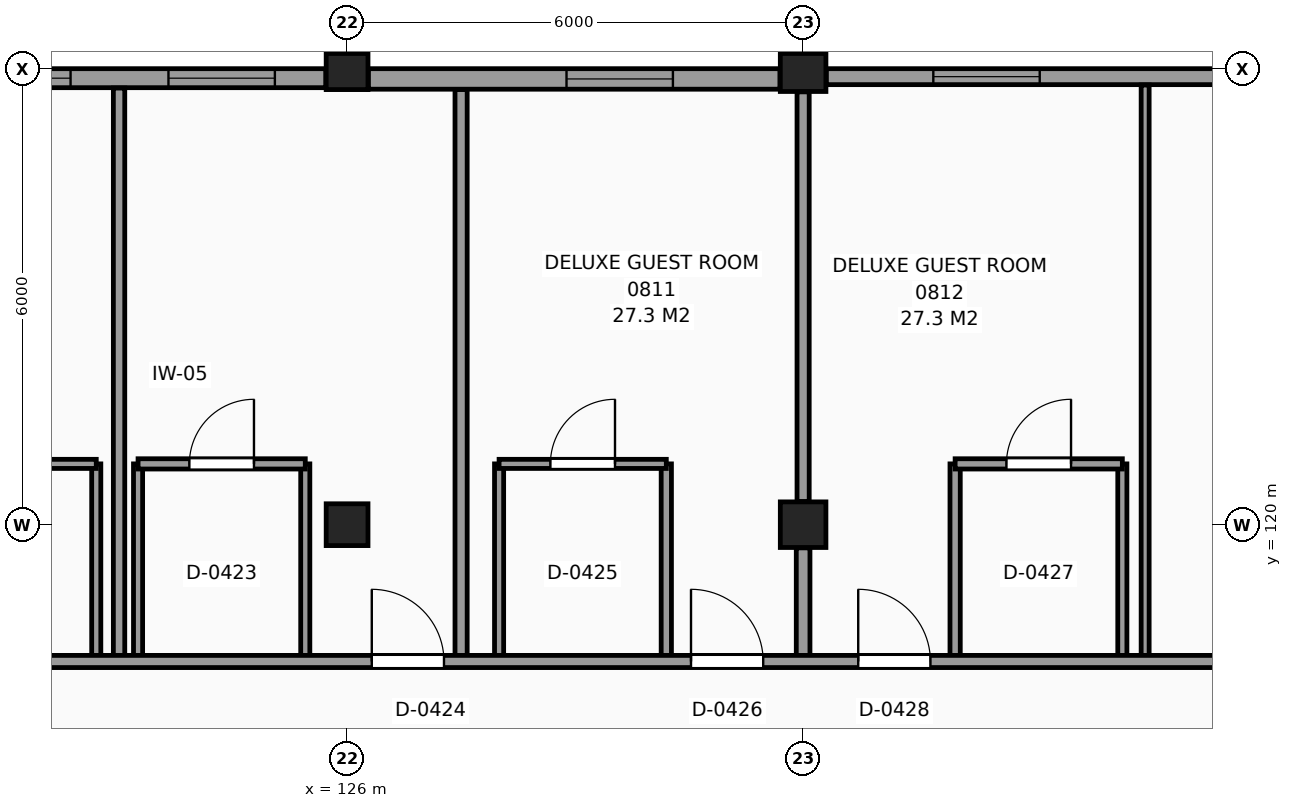
"""IFC4 building model, lengths in metres.
Left out: names, types, materials, properties, quantities, classifications, styles, units other than length and angle.
Written with IfcOpenShell. Run it as: python <this file> out.ifc"""

import sys

from ifc_helpers import new_model, si_unit, direction, frame, frame_2d, origin, origin_2d, place, context, subcontext, project, spatial, rectangle, extrude, element, fill, save


model = new_model("IFC4")
c1 = context("Model", 3, precision=1e-05, world=origin(), true_north=direction((0.0, 1.0)))
c2 = subcontext(c1, "Body", "Model", "MODEL_VIEW")
j1 = project(units=[si_unit("LENGTHUNIT", "METRE"), si_unit("PLANEANGLEUNIT", "RADIAN")], contexts=[c1])
p1 = place(None, origin())
s1 = spatial("IfcSite", under=j1, at=p1, CompositionType="ELEMENT")
p2 = place(p1, origin())
s2 = spatial("IfcBuilding", under=s1, at=p2, CompositionType="ELEMENT")
p3 = place(p2, frame((0.0, 0.0, 34.8)))
s3 = spatial("IfcBuildingStorey", under=s2, at=p3, CompositionType="ELEMENT", Elevation=34.8)
for number, where, z_axis, x_axis in (
    (1, (126.0, 120.0, 0.0), (0.0, 0.0, 1.0), (1.0, 0.0, 0.0)),
    (2, (126.0, 126.0, 0.0), (0.0, 0.0, 1.0), (1.0, 0.0, 0.0)),
):
    element("IfcColumn", number, at=place(p3, frame(where, z_axis=z_axis, x_axis=x_axis)), inside=s3, PredefinedType="COLUMN", context=c2, shape_type="SweptSolid", body=[
        extrude(rectangle(XDim=0.55, YDim=0.55, at=origin_2d()), origin(), (0.0, 0.0, 1.0), 3.3),
    ])
for number, where, z_axis, x_axis in (
    (3, (132.0, 120.0, 0.0), (0.0, 0.0, 1.0), (1.0, 0.0, 0.0)),
    (4, (132.0, 126.0, 0.0), (0.0, 0.0, 1.0), (1.0, 0.0, 0.0)),
):
    element("IfcColumn", number, at=place(p3, frame(where, z_axis=z_axis, x_axis=x_axis)), inside=s3, PredefinedType="COLUMN", context=c2, shape_type="SweptSolid", body=[
        extrude(rectangle(XDim=0.6, YDim=0.6, at=origin_2d()), origin(), (0.0, 0.0, 1.0), 3.3),
    ])
p4 = place(p3, frame((137.72, 125.895, 0.0), z_axis=(0.0, 0.0, 1.0), x_axis=(-1.0, 0.0, 0.0)))
e5 = element("IfcWall", 5, at=p4, inside=s3, PredefinedType="SOLIDWALL", context=c2, shape_type="SweptSolid", body=[
    extrude(rectangle(XDim=5.415, YDim=0.21, at=frame_2d((2.708, 0.0))), origin(), (0.0, 0.0, 1.0), 2.42),
])
p5 = place(p4, frame((2.607, 0.0, 0.8)))
e6 = element("IfcOpeningElement", 6, at=p5, cuts=e5, PredefinedType="OPENING", context=c2, shape_type="SweptSolid", body=[
    extrude(rectangle(XDim=1.4, YDim=1.4, at=frame_2d((0.7, 0.7))), frame((0.0, 0.115, 0.0), z_axis=(0.0, -1.0, 0.0), x_axis=(1.0, 0.0, 0.0)), (0.0, 0.0, 1.0), 0.23),
])
p6 = place(p3, frame((131.695, 125.865, 0.0), z_axis=(0.0, 0.0, 1.0), x_axis=(-1.0, 0.0, 0.0)))
e7 = element("IfcWall", 7, at=p6, inside=s3, PredefinedType="SOLIDWALL", context=c2, shape_type="SweptSolid", body=[
    extrude(rectangle(XDim=5.415, YDim=0.27, at=frame_2d((2.708, 0.0))), origin(), (0.0, 0.0, 1.0), 2.42),
])
p7 = place(p6, frame((1.408, 0.0, 0.8)))
e8 = element("IfcOpeningElement", 8, at=p7, cuts=e7, PredefinedType="OPENING", context=c2, shape_type="SweptSolid", body=[
    extrude(rectangle(XDim=1.4, YDim=1.4, at=frame_2d((0.7, 0.7))), frame((0.0, 0.145, 0.0), z_axis=(0.0, -1.0, 0.0), x_axis=(1.0, 0.0, 0.0)), (0.0, 0.0, 1.0), 0.29),
])
p8 = place(p3, frame((125.72, 125.875, 0.0), z_axis=(0.0, 0.0, 1.0), x_axis=(-1.0, 0.0, 0.0)))
e9 = element("IfcWall", 9, at=p8, inside=s3, PredefinedType="SOLIDWALL", context=c2, shape_type="SweptSolid", body=[
    extrude(rectangle(XDim=5.415, YDim=0.25, at=frame_2d((2.708, 0.0))), origin(), (0.0, 0.0, 1.0), 2.42),
])
p9 = place(p8, frame((3.358, 0.0, 0.8)))
e10 = element("IfcOpeningElement", 10, at=p9, cuts=e9, PredefinedType="OPENING", context=c2, shape_type="SweptSolid", body=[
    extrude(rectangle(XDim=1.4, YDim=1.4, at=frame_2d((0.7, 0.7))), frame((0.0, 0.135, 0.0), z_axis=(0.0, -1.0, 0.0), x_axis=(1.0, 0.0, 0.0)), (0.0, 0.0, 1.0), 0.27),
])
p10 = place(p8, frame((0.67, 0.0, 0.8)))
e11 = element("IfcOpeningElement", 11, at=p10, cuts=e9, PredefinedType="OPENING", context=c2, shape_type="SweptSolid", body=[
    extrude(rectangle(XDim=1.4, YDim=1.4, at=frame_2d((0.7, 0.7))), frame((0.0, 0.135, 0.0), z_axis=(0.0, -1.0, 0.0), x_axis=(1.0, 0.0, 0.0)), (0.0, 0.0, 1.0), 0.27),
])
p11 = place(p3, frame((122.7, 118.2, 0.0), z_axis=(0.0, 0.0, 1.0), x_axis=(0.0, 1.0, 0.0)))
e12 = element("IfcWall", 12, at=p11, inside=s3, PredefinedType="PARTITIONING", context=c2, shape_type="SweptSolid", body=[
    extrude(rectangle(XDim=2.6, YDim=0.12, at=frame_2d((1.3, 0.0))), origin(), (0.0, 0.0, 1.0), 3.07),
])
p12 = place(p3, frame((123.0, 118.2, 0.0), z_axis=(0.0, 0.0, 1.0), x_axis=(0.0, 1.0, 0.0)))
e13 = element("IfcWall", 13, at=p12, inside=s3, PredefinedType="PARTITIONING", context=c2, shape_type="SweptSolid", body=[
    extrude(rectangle(XDim=7.545, YDim=0.15, at=frame_2d((3.772, 0.0))), origin(), (0.0, 0.0, 1.0), 3.07),
])
for number, where, z_axis, x_axis in (
    (14, (123.25, 118.2, 0.0), (0.0, 0.0, 1.0), (0.0, 1.0, 0.0)),
    (15, (125.45, 118.2, 0.0), (0.0, 0.0, 1.0), (0.0, 1.0, 0.0)),
):
    element("IfcWall", number, at=place(p3, frame(where, z_axis=z_axis, x_axis=x_axis)), inside=s3, PredefinedType="PARTITIONING", context=c2, shape_type="SweptSolid", body=[
        extrude(rectangle(XDim=2.6, YDim=0.12, at=frame_2d((1.3, 0.0))), origin(), (0.0, 0.0, 1.0), 3.07),
    ])
p13 = place(p3, frame((127.5, 118.2, 0.0), z_axis=(0.0, 0.0, 1.0), x_axis=(0.0, 1.0, 0.0)))
e16 = element("IfcWall", 16, at=p13, inside=s3, PredefinedType="PARTITIONING", context=c2, shape_type="SweptSolid", body=[
    extrude(rectangle(XDim=7.525, YDim=0.16, at=frame_2d((3.763, 0.0))), origin(), (0.0, 0.0, 1.0), 3.07),
])
p14 = place(p3, frame((128.0, 118.2, 0.0), z_axis=(0.0, 0.0, 1.0), x_axis=(0.0, 1.0, 0.0)))
e17 = element("IfcWall", 17, at=p14, inside=s3, PredefinedType="PARTITIONING", context=c2, shape_type="SweptSolid", body=[
    extrude(rectangle(XDim=2.6, YDim=0.12, at=frame_2d((1.3, 0.0))), origin(), (0.0, 0.0, 1.0), 3.07),
])
p15 = place(p3, frame((130.2, 118.2, 0.0), z_axis=(0.0, 0.0, 1.0), x_axis=(0.0, 1.0, 0.0)))
e18 = element("IfcWall", 18, at=p15, inside=s3, PredefinedType="PARTITIONING", context=c2, shape_type="SweptSolid", body=[
    extrude(rectangle(XDim=2.6, YDim=0.135, at=frame_2d((1.3, 0.0))), origin(), (0.0, 0.0, 1.0), 3.07),
])
p16 = place(p3, frame((132.0, 118.2, 0.0), z_axis=(0.0, 0.0, 1.0), x_axis=(0.0, 1.0, 0.0)))
e19 = element("IfcWall", 19, at=p16, inside=s3, PredefinedType="PARTITIONING", context=c2, shape_type="SweptSolid", body=[
    extrude(rectangle(XDim=1.495, YDim=0.18, at=frame_2d((0.748, 0.0))), origin(), (0.0, 0.0, 1.0), 2.27),
])
p17 = place(p3, frame((132.0, 120.305, 0.0), z_axis=(0.0, 0.0, 1.0), x_axis=(0.0, 1.0, 0.0)))
e20 = element("IfcWall", 20, at=p17, inside=s3, PredefinedType="PARTITIONING", context=c2, shape_type="SweptSolid", body=[
    extrude(rectangle(XDim=5.39, YDim=0.16, at=frame_2d((2.695, 0.0))), origin(), (0.0, 0.0, 1.0), 2.27),
])
p18 = place(p3, frame((134.0, 118.2, 0.0), z_axis=(0.0, 0.0, 1.0), x_axis=(0.0, 1.0, 0.0)))
e21 = element("IfcWall", 21, at=p18, inside=s3, PredefinedType="PARTITIONING", context=c2, shape_type="SweptSolid", body=[
    extrude(rectangle(XDim=2.6, YDim=0.135, at=frame_2d((1.3, 0.0))), origin(), (0.0, 0.0, 1.0), 3.07),
])
p19 = place(p3, frame((136.2, 118.2, 0.0), z_axis=(0.0, 0.0, 1.0), x_axis=(0.0, 1.0, 0.0)))
e22 = element("IfcWall", 22, at=p19, inside=s3, PredefinedType="PARTITIONING", context=c2, shape_type="SweptSolid", body=[
    extrude(rectangle(XDim=2.6, YDim=0.12, at=frame_2d((1.3, 0.0))), origin(), (0.0, 0.0, 1.0), 3.07),
])
p20 = place(p3, frame((136.5, 118.2, 0.0), z_axis=(0.0, 0.0, 1.0), x_axis=(0.0, 1.0, 0.0)))
e23 = element("IfcWall", 23, at=p20, inside=s3, PredefinedType="PARTITIONING", context=c2, shape_type="SweptSolid", body=[
    extrude(rectangle(XDim=7.585, YDim=0.105, at=frame_2d((3.792, 0.0))), origin(), (0.0, 0.0, 1.0), 3.07),
])
p21 = place(p3, frame((66.275, 118.2, 0.0), z_axis=(0.0, 0.0, 1.0), x_axis=(1.0, 0.0, 0.0)))
e24 = element("IfcWall", 24, at=p21, inside=s3, PredefinedType="PARTITIONING", context=c2, shape_type="SweptSolid", body=[
    extrude(rectangle(XDim=110.225, YDim=0.16, at=frame_2d((55.113, 0.0))), origin(), (0.0, 0.0, 1.0), 3.07),
])
p22 = place(p21, frame((0.45, 0.0, 0.0)))
e25 = element("IfcOpeningElement", 25, at=p22, cuts=e24, PredefinedType="OPENING", context=c2, shape_type="SweptSolid", body=[
    extrude(rectangle(XDim=0.95, YDim=2.1, at=frame_2d((0.475, 1.05))), frame((0.0, 0.09, 0.0), z_axis=(0.0, -1.0, 0.0), x_axis=(1.0, 0.0, 0.0)), (0.0, 0.0, 1.0), 0.18),
])
p23 = place(p21, frame((4.85, 0.0, 0.0)))
e26 = element("IfcOpeningElement", 26, at=p23, cuts=e24, PredefinedType="OPENING", context=c2, shape_type="SweptSolid", body=[
    extrude(rectangle(XDim=0.95, YDim=2.1, at=frame_2d((0.475, 1.05))), frame((0.0, 0.09, 0.0), z_axis=(0.0, -1.0, 0.0), x_axis=(1.0, 0.0, 0.0)), (0.0, 0.0, 1.0), 0.18),
])
p24 = place(p21, frame((9.35, 0.0, 0.0)))
e27 = element("IfcOpeningElement", 27, at=p24, cuts=e24, PredefinedType="OPENING", context=c2, shape_type="SweptSolid", body=[
    extrude(rectangle(XDim=0.95, YDim=2.1, at=frame_2d((0.475, 1.05))), frame((0.0, 0.09, 0.0), z_axis=(0.0, -1.0, 0.0), x_axis=(1.0, 0.0, 0.0)), (0.0, 0.0, 1.0), 0.18),
])
p25 = place(p21, frame((18.45, 0.0, 0.0)))
e28 = element("IfcOpeningElement", 28, at=p25, cuts=e24, PredefinedType="OPENING", context=c2, shape_type="SweptSolid", body=[
    extrude(rectangle(XDim=0.95, YDim=2.1, at=frame_2d((0.475, 1.05))), frame((0.0, 0.09, 0.0), z_axis=(0.0, -1.0, 0.0), x_axis=(1.0, 0.0, 0.0)), (0.0, 0.0, 1.0), 0.18),
])
p26 = place(p21, frame((22.85, 0.0, 0.0)))
e29 = element("IfcOpeningElement", 29, at=p26, cuts=e24, PredefinedType="OPENING", context=c2, shape_type="SweptSolid", body=[
    extrude(rectangle(XDim=0.95, YDim=2.1, at=frame_2d((0.475, 1.05))), frame((0.0, 0.09, 0.0), z_axis=(0.0, -1.0, 0.0), x_axis=(1.0, 0.0, 0.0)), (0.0, 0.0, 1.0), 0.18),
])
p27 = place(p21, frame((27.35, 0.0, 0.0)))
e30 = element("IfcOpeningElement", 30, at=p27, cuts=e24, PredefinedType="OPENING", context=c2, shape_type="SweptSolid", body=[
    extrude(rectangle(XDim=0.95, YDim=2.1, at=frame_2d((0.475, 1.05))), frame((0.0, 0.09, 0.0), z_axis=(0.0, -1.0, 0.0), x_axis=(1.0, 0.0, 0.0)), (0.0, 0.0, 1.0), 0.18),
])
p28 = place(p21, frame((42.05, 0.0, 0.0)))
e31 = element("IfcOpeningElement", 31, at=p28, cuts=e24, PredefinedType="OPENING", context=c2, shape_type="SweptSolid", body=[
    extrude(rectangle(XDim=0.95, YDim=2.1, at=frame_2d((0.475, 1.05))), frame((0.0, 0.09, 0.0), z_axis=(0.0, -1.0, 0.0), x_axis=(1.0, 0.0, 0.0)), (0.0, 0.0, 1.0), 0.18),
])
p29 = place(p21, frame((50.3, 0.0, 0.0)))
e32 = element("IfcOpeningElement", 32, at=p29, cuts=e24, PredefinedType="OPENING", context=c2, shape_type="SweptSolid", body=[
    extrude(rectangle(XDim=0.95, YDim=2.1, at=frame_2d((0.475, 1.05))), frame((0.0, 0.09, 0.0), z_axis=(0.0, -1.0, 0.0), x_axis=(1.0, 0.0, 0.0)), (0.0, 0.0, 1.0), 0.18),
])
p30 = place(p21, frame((52.85, 0.0, 0.0)))
e33 = element("IfcOpeningElement", 33, at=p30, cuts=e24, PredefinedType="OPENING", context=c2, shape_type="SweptSolid", body=[
    extrude(rectangle(XDim=0.95, YDim=2.1, at=frame_2d((0.475, 1.05))), frame((0.0, 0.09, 0.0), z_axis=(0.0, -1.0, 0.0), x_axis=(1.0, 0.0, 0.0)), (0.0, 0.0, 1.0), 0.18),
])
p31 = place(p21, frame((60.05, 0.0, 0.0)))
e34 = element("IfcOpeningElement", 34, at=p31, cuts=e24, PredefinedType="OPENING", context=c2, shape_type="SweptSolid", body=[
    extrude(rectangle(XDim=0.95, YDim=2.1, at=frame_2d((0.475, 1.05))), frame((0.0, 0.09, 0.0), z_axis=(0.0, -1.0, 0.0), x_axis=(1.0, 0.0, 0.0)), (0.0, 0.0, 1.0), 0.18),
])
p32 = place(p21, frame((64.25, 0.0, 0.0)))
e35 = element("IfcOpeningElement", 35, at=p32, cuts=e24, PredefinedType="OPENING", context=c2, shape_type="SweptSolid", body=[
    extrude(rectangle(XDim=0.95, YDim=2.1, at=frame_2d((0.475, 1.05))), frame((0.0, 0.09, 0.0), z_axis=(0.0, -1.0, 0.0), x_axis=(1.0, 0.0, 0.0)), (0.0, 0.0, 1.0), 0.18),
])
p33 = place(p21, frame((66.45, 0.0, 0.0)))
e36 = element("IfcOpeningElement", 36, at=p33, cuts=e24, PredefinedType="OPENING", context=c2, shape_type="SweptSolid", body=[
    extrude(rectangle(XDim=0.95, YDim=2.1, at=frame_2d((0.475, 1.05))), frame((0.0, 0.09, 0.0), z_axis=(0.0, -1.0, 0.0), x_axis=(1.0, 0.0, 0.0)), (0.0, 0.0, 1.0), 0.18),
])
p34 = place(p21, frame((72.45, 0.0, 0.0)))
e37 = element("IfcOpeningElement", 37, at=p34, cuts=e24, PredefinedType="OPENING", context=c2, shape_type="SweptSolid", body=[
    extrude(rectangle(XDim=0.95, YDim=2.1, at=frame_2d((0.475, 1.05))), frame((0.0, 0.09, 0.0), z_axis=(0.0, -1.0, 0.0), x_axis=(1.0, 0.0, 0.0)), (0.0, 0.0, 1.0), 0.18),
])
p35 = place(p21, frame((82.25, 0.0, 0.0)))
e38 = element("IfcOpeningElement", 38, at=p35, cuts=e24, PredefinedType="OPENING", context=c2, shape_type="SweptSolid", body=[
    extrude(rectangle(XDim=0.95, YDim=2.1, at=frame_2d((0.475, 1.05))), frame((0.0, 0.09, 0.0), z_axis=(0.0, -1.0, 0.0), x_axis=(1.0, 0.0, 0.0)), (0.0, 0.0, 1.0), 0.18),
])
p36 = place(p21, frame((84.45, 0.0, 0.0)))
e39 = element("IfcOpeningElement", 39, at=p36, cuts=e24, PredefinedType="OPENING", context=c2, shape_type="SweptSolid", body=[
    extrude(rectangle(XDim=0.95, YDim=2.1, at=frame_2d((0.475, 1.05))), frame((0.0, 0.09, 0.0), z_axis=(0.0, -1.0, 0.0), x_axis=(1.0, 0.0, 0.0)), (0.0, 0.0, 1.0), 0.18),
])
p37 = place(p21, frame((88.85, 0.0, 0.0)))
e40 = element("IfcOpeningElement", 40, at=p37, cuts=e24, PredefinedType="OPENING", context=c2, shape_type="SweptSolid", body=[
    extrude(rectangle(XDim=0.95, YDim=2.1, at=frame_2d((0.475, 1.05))), frame((0.0, 0.09, 0.0), z_axis=(0.0, -1.0, 0.0), x_axis=(1.0, 0.0, 0.0)), (0.0, 0.0, 1.0), 0.18),
])
p38 = place(p21, frame((96.05, 0.0, 0.0)))
e41 = element("IfcOpeningElement", 41, at=p38, cuts=e24, PredefinedType="OPENING", context=c2, shape_type="SweptSolid", body=[
    extrude(rectangle(XDim=0.95, YDim=2.1, at=frame_2d((0.475, 1.05))), frame((0.0, 0.09, 0.0), z_axis=(0.0, -1.0, 0.0), x_axis=(1.0, 0.0, 0.0)), (0.0, 0.0, 1.0), 0.18),
])
p39 = place(p21, frame((104.3, 0.0, 0.0)))
e42 = element("IfcOpeningElement", 42, at=p39, cuts=e24, PredefinedType="OPENING", context=c2, shape_type="SweptSolid", body=[
    extrude(rectangle(XDim=0.95, YDim=2.1, at=frame_2d((0.475, 1.05))), frame((0.0, 0.09, 0.0), z_axis=(0.0, -1.0, 0.0), x_axis=(1.0, 0.0, 0.0)), (0.0, 0.0, 1.0), 0.18),
])
p40 = place(p21, frame((108.45, 0.0, 0.0)))
e43 = element("IfcOpeningElement", 43, at=p40, cuts=e24, PredefinedType="OPENING", context=c2, shape_type="SweptSolid", body=[
    extrude(rectangle(XDim=0.95, YDim=2.1, at=frame_2d((0.475, 1.05))), frame((0.0, 0.09, 0.0), z_axis=(0.0, -1.0, 0.0), x_axis=(1.0, 0.0, 0.0)), (0.0, 0.0, 1.0), 0.18),
])
p41 = place(p3, frame((120.5, 120.8, 0.0), z_axis=(0.0, 0.0, 1.0), x_axis=(1.0, 0.0, 0.0)))
e44 = element("IfcWall", 44, at=p41, inside=s3, PredefinedType="PARTITIONING", context=c2, shape_type="SweptSolid", body=[
    extrude(rectangle(XDim=2.2, YDim=0.12, at=frame_2d((1.1, 0.0))), origin(), (0.0, 0.0, 1.0), 3.07),
])
p42 = place(p41, frame((0.675, 0.0, 0.0)))
e45 = element("IfcOpeningElement", 45, at=p42, cuts=e44, PredefinedType="OPENING", context=c2, shape_type="SweptSolid", body=[
    extrude(rectangle(XDim=0.85, YDim=2.1, at=frame_2d((0.425, 1.05))), frame((0.0, 0.07, 0.0), z_axis=(0.0, -1.0, 0.0), x_axis=(1.0, 0.0, 0.0)), (0.0, 0.0, 1.0), 0.14),
])
p43 = place(p3, frame((123.25, 120.8, 0.0), z_axis=(0.0, 0.0, 1.0), x_axis=(1.0, 0.0, 0.0)))
e46 = element("IfcWall", 46, at=p43, inside=s3, PredefinedType="PARTITIONING", context=c2, shape_type="SweptSolid", body=[
    extrude(rectangle(XDim=2.2, YDim=0.135, at=frame_2d((1.1, 0.0))), origin(), (0.0, 0.0, 1.0), 3.07),
])
p44 = place(p43, frame((0.675, 0.0, 0.0)))
e47 = element("IfcOpeningElement", 47, at=p44, cuts=e46, PredefinedType="OPENING", context=c2, shape_type="SweptSolid", body=[
    extrude(rectangle(XDim=0.85, YDim=2.1, at=frame_2d((0.425, 1.05))), frame((0.0, 0.078, 0.0), z_axis=(0.0, -1.0, 0.0), x_axis=(1.0, 0.0, 0.0)), (0.0, 0.0, 1.0), 0.155),
])
p45 = place(p3, frame((128.0, 120.8, 0.0), z_axis=(0.0, 0.0, 1.0), x_axis=(1.0, 0.0, 0.0)))
e48 = element("IfcWall", 48, at=p45, inside=s3, PredefinedType="PARTITIONING", context=c2, shape_type="SweptSolid", body=[
    extrude(rectangle(XDim=2.2, YDim=0.12, at=frame_2d((1.1, 0.0))), origin(), (0.0, 0.0, 1.0), 3.07),
])
p46 = place(p45, frame((0.675, 0.0, 0.0)))
e49 = element("IfcOpeningElement", 49, at=p46, cuts=e48, PredefinedType="OPENING", context=c2, shape_type="SweptSolid", body=[
    extrude(rectangle(XDim=0.85, YDim=2.1, at=frame_2d((0.425, 1.05))), frame((0.0, 0.07, 0.0), z_axis=(0.0, -1.0, 0.0), x_axis=(1.0, 0.0, 0.0)), (0.0, 0.0, 1.0), 0.14),
])
p47 = place(p3, frame((134.0, 120.8, 0.0), z_axis=(0.0, 0.0, 1.0), x_axis=(1.0, 0.0, 0.0)))
e50 = element("IfcWall", 50, at=p47, inside=s3, PredefinedType="PARTITIONING", context=c2, shape_type="SweptSolid", body=[
    extrude(rectangle(XDim=2.2, YDim=0.135, at=frame_2d((1.1, 0.0))), origin(), (0.0, 0.0, 1.0), 3.07),
])
p48 = place(p47, frame((0.675, 0.0, 0.0)))
e51 = element("IfcOpeningElement", 51, at=p48, cuts=e50, PredefinedType="OPENING", context=c2, shape_type="SweptSolid", body=[
    extrude(rectangle(XDim=0.85, YDim=2.1, at=frame_2d((0.425, 1.05))), frame((0.0, 0.078, 0.0), z_axis=(0.0, -1.0, 0.0), x_axis=(1.0, 0.0, 0.0)), (0.0, 0.0, 1.0), 0.155),
])
p49 = place(p9, origin())
e52 = element("IfcWindow", 52, at=p49, inside=s3, PartitioningType="SINGLE_PANEL", PredefinedType="WINDOW", context=c2, shape_type="SweptSolid", body=[
    extrude(rectangle(XDim=1.4, YDim=1.4, at=frame_2d((0.7, 0.7))), frame((0.0, 0.03, 0.0), z_axis=(0.0, -1.0, 0.0), x_axis=(1.0, 0.0, 0.0)), (0.0, 0.0, 1.0), 0.06),
])
fill(e10, e52)
p50 = place(p10, origin())
e53 = element("IfcWindow", 53, at=p50, inside=s3, PartitioningType="SINGLE_PANEL", PredefinedType="WINDOW", context=c2, shape_type="SweptSolid", body=[
    extrude(rectangle(XDim=1.4, YDim=1.4, at=frame_2d((0.7, 0.7))), frame((0.0, 0.03, 0.0), z_axis=(0.0, -1.0, 0.0), x_axis=(1.0, 0.0, 0.0)), (0.0, 0.0, 1.0), 0.06),
])
fill(e11, e53)
p51 = place(p7, origin())
e54 = element("IfcWindow", 54, at=p51, inside=s3, PartitioningType="SINGLE_PANEL", PredefinedType="WINDOW", context=c2, shape_type="SweptSolid", body=[
    extrude(rectangle(XDim=1.4, YDim=1.4, at=frame_2d((0.7, 0.7))), frame((0.0, 0.03, 0.0), z_axis=(0.0, -1.0, 0.0), x_axis=(1.0, 0.0, 0.0)), (0.0, 0.0, 1.0), 0.06),
])
fill(e8, e54)
p52 = place(p5, origin())
e55 = element("IfcWindow", 55, at=p52, inside=s3, PartitioningType="SINGLE_PANEL", PredefinedType="WINDOW", context=c2, shape_type="SweptSolid", body=[
    extrude(rectangle(XDim=1.4, YDim=1.4, at=frame_2d((0.7, 0.7))), frame((0.0, 0.03, 0.0), z_axis=(0.0, -1.0, 0.0), x_axis=(1.0, 0.0, 0.0)), (0.0, 0.0, 1.0), 0.06),
])
fill(e6, e55)
p53 = place(p44, origin())
e56 = element("IfcDoor", 56, at=p53, inside=s3, OperationType="SINGLE_SWING_RIGHT", PredefinedType="DOOR", context=c2, shape_type="SweptSolid", body=[
    extrude(rectangle(XDim=0.85, YDim=2.1, at=frame_2d((0.425, 1.05))), frame((0.0, 0.025, 0.0), z_axis=(0.0, -1.0, 0.0), x_axis=(1.0, 0.0, 0.0)), (0.0, 0.0, 1.0), 0.05),
])
fill(e47, e56)
p54 = place(p31, origin())
e57 = element("IfcDoor", 57, at=p54, inside=s3, OperationType="SINGLE_SWING_LEFT", PredefinedType="DOOR", context=c2, shape_type="SweptSolid", body=[
    extrude(rectangle(XDim=0.95, YDim=2.1, at=frame_2d((0.475, 1.05))), frame((0.0, 0.025, 0.0), z_axis=(0.0, -1.0, 0.0), x_axis=(1.0, 0.0, 0.0)), (0.0, 0.0, 1.0), 0.05),
])
fill(e34, e57)
p55 = place(p46, origin())
e58 = element("IfcDoor", 58, at=p55, inside=s3, OperationType="SINGLE_SWING_RIGHT", PredefinedType="DOOR", context=c2, shape_type="SweptSolid", body=[
    extrude(rectangle(XDim=0.85, YDim=2.1, at=frame_2d((0.425, 1.05))), frame((0.0, 0.025, 0.0), z_axis=(0.0, -1.0, 0.0), x_axis=(1.0, 0.0, 0.0)), (0.0, 0.0, 1.0), 0.05),
])
fill(e49, e58)
p56 = place(p32, origin())
e59 = element("IfcDoor", 59, at=p56, inside=s3, OperationType="SINGLE_SWING_LEFT", PredefinedType="DOOR", context=c2, shape_type="SweptSolid", body=[
    extrude(rectangle(XDim=0.95, YDim=2.1, at=frame_2d((0.475, 1.05))), frame((0.0, 0.025, 0.0), z_axis=(0.0, -1.0, 0.0), x_axis=(1.0, 0.0, 0.0)), (0.0, 0.0, 1.0), 0.05),
])
fill(e35, e59)
p57 = place(p48, origin())
e60 = element("IfcDoor", 60, at=p57, inside=s3, OperationType="SINGLE_SWING_RIGHT", PredefinedType="DOOR", context=c2, shape_type="SweptSolid", body=[
    extrude(rectangle(XDim=0.85, YDim=2.1, at=frame_2d((0.425, 1.05))), frame((0.0, 0.025, 0.0), z_axis=(0.0, -1.0, 0.0), x_axis=(1.0, 0.0, 0.0)), (0.0, 0.0, 1.0), 0.05),
])
fill(e51, e60)
p58 = place(p33, origin())
e61 = element("IfcDoor", 61, at=p58, inside=s3, OperationType="SINGLE_SWING_LEFT", PredefinedType="DOOR", context=c2, shape_type="SweptSolid", body=[
    extrude(rectangle(XDim=0.95, YDim=2.1, at=frame_2d((0.475, 1.05))), frame((0.0, 0.025, 0.0), z_axis=(0.0, -1.0, 0.0), x_axis=(1.0, 0.0, 0.0)), (0.0, 0.0, 1.0), 0.05),
])
fill(e36, e61)
save(model, sys.argv[1])
